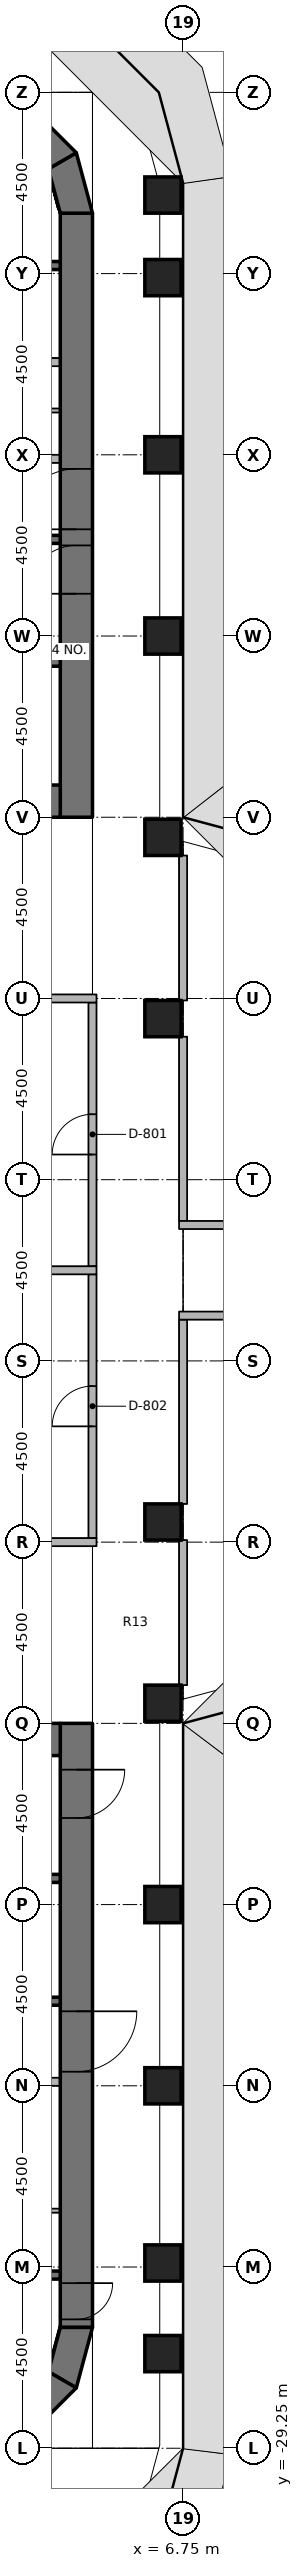
"""IFC4 building model, lengths in metres.
Left out: names, types, materials, properties, quantities, classifications, styles, units other than length and angle.
Written with IfcOpenShell. Run it as: python <this file> out.ifc"""

import sys

from ifc_helpers import new_model, si_unit, direction, frame, frame_2d, origin, origin_2d, place, context, subcontext, project, spatial, polyline, rectangle, outline, extrude, element, fill, save


model = new_model("IFC4")
c1 = context("Model", 3, precision=1e-05, world=origin(), true_north=direction((0.0, 1.0)))
c2 = subcontext(c1, "Body", "Model", "MODEL_VIEW")
j1 = project(units=[si_unit("LENGTHUNIT", "METRE"), si_unit("PLANEANGLEUNIT", "RADIAN")], contexts=[c1])
p1 = place(None, origin())
s1 = spatial("IfcSite", under=j1, at=p1, CompositionType="ELEMENT")
p2 = place(p1, origin())
s2 = spatial("IfcBuilding", under=s1, at=p2, CompositionType="ELEMENT")
p3 = place(p2, frame((0.0, 0.0, 98.0)))
s3 = spatial("IfcBuildingStorey", under=s2, at=p3, CompositionType="ELEMENT", Elevation=98.0)
for number, where, z_axis, x_axis in (
    (1, (6.25, -26.9, 0.0), (0.0, 0.0, 1.0), (1.0, 0.0, 0.0)),
    (2, (6.25, -24.65, 0.0), (0.0, 0.0, 1.0), (1.0, 0.0, 0.0)),
    (3, (6.25, -20.25, 0.0), (0.0, 0.0, 1.0), (1.0, 0.0, 0.0)),
    (4, (6.25, -15.75, 0.0), (0.0, 0.0, 1.0), (1.0, 0.0, 0.0)),
    (5, (6.25, -10.75, 0.0), (0.0, 0.0, 1.0), (1.0, 0.0, 0.0)),
    (6, (6.25, -6.25, 0.0), (0.0, 0.0, 1.0), (1.0, 0.0, 0.0)),
    (7, (6.25, 6.25, 0.0), (0.0, 0.0, 1.0), (1.0, 0.0, 0.0)),
    (8, (6.25, 10.75, 0.0), (0.0, 0.0, 1.0), (1.0, 0.0, 0.0)),
    (9, (6.25, 15.75, 0.0), (0.0, 0.0, 1.0), (1.0, 0.0, 0.0)),
    (10, (6.25, 20.25, 0.0), (0.0, 0.0, 1.0), (1.0, 0.0, 0.0)),
    (11, (6.25, 24.65, 0.0), (0.0, 0.0, 1.0), (1.0, 0.0, 0.0)),
    (12, (6.25, 26.7, 0.0), (0.0, 0.0, 1.0), (1.0, 0.0, 0.0)),
):
    element("IfcColumn", number, at=place(p3, frame(where, z_axis=z_axis, x_axis=x_axis)), inside=s3, PredefinedType="COLUMN", context=c2, shape_type="SweptSolid", body=[
        extrude(rectangle(XDim=0.9, YDim=0.9, at=origin_2d()), origin(), (0.0, 0.0, 1.0), 3.65),
    ])
p4 = place(p3, frame((4.1, 11.25, 0.0), z_axis=(0.0, 0.0, 1.0), x_axis=(0.0, 1.0, 0.0)))
e13 = element("IfcWall", 13, at=p4, inside=s3, PredefinedType="SHEAR", context=c2, shape_type="SweptSolid", body=[
    extrude(rectangle(XDim=15.0, YDim=0.8, at=frame_2d((7.5, 0.0))), origin(), (0.0, 0.0, 1.0), 3.8),
])
p5 = place(p4, frame((7.15, 0.0, 0.0)))
e14 = element("IfcOpeningElement", 14, at=p5, cuts=e13, PredefinedType="OPENING", context=c2, shape_type="SweptSolid", body=[
    extrude(rectangle(XDim=1.5, YDim=2.3, at=frame_2d((0.75, 1.15))), frame((0.0, 0.41, 0.0), z_axis=(0.0, -1.0, 0.0), x_axis=(1.0, 0.0, 0.0)), (0.0, 0.0, 1.0), 0.82),
])
p6 = place(p4, frame((5.55, 0.0, 0.0)))
e15 = element("IfcOpeningElement", 15, at=p6, cuts=e13, PredefinedType="OPENING", context=c2, shape_type="SweptSolid", body=[
    extrude(rectangle(XDim=1.2, YDim=2.1, at=frame_2d((0.6, 1.05))), frame((0.0, 0.41, 0.0), z_axis=(0.0, -1.0, 0.0), x_axis=(1.0, 0.0, 0.0)), (0.0, 0.0, 1.0), 0.82),
])
p7 = place(p3, frame((-3.7, 11.65, 0.0), z_axis=(0.0, 0.0, 1.0), x_axis=(1.0, 0.0, 0.0)))
e16 = element("IfcWall", 16, at=p7, inside=s3, PredefinedType="SHEAR", context=c2, shape_type="SweptSolid", body=[
    extrude(rectangle(XDim=7.4, YDim=0.8, at=frame_2d((3.7, 0.0))), origin(), (0.0, 0.0, 1.0), 3.8),
])
p8 = place(p3, origin())
e17 = element("IfcWall", 17, at=p8, inside=s3, PredefinedType="SHEAR", context=c2, shape_type="SweptSolid", body=[
    extrude(outline(polyline([(4.5, 26.25), (4.098, 27.75), (3.405, 27.35), (3.7, 26.25), (4.5, 26.25)])), origin(), (0.0, 0.0, 1.0), 3.8),
])
p9 = place(p3, origin())
e18 = element("IfcWall", 18, at=p9, inside=s3, PredefinedType="SHEAR", context=c2, shape_type="SweptSolid", body=[
    extrude(outline(polyline([(4.098, 27.75), (3.0, 28.848), (2.6, 28.155), (3.405, 27.35), (4.098, 27.75)])), origin(), (0.0, 0.0, 1.0), 3.8),
])
p10 = place(p3, frame((4.1, -11.25, 0.0), z_axis=(0.0, 0.0, 1.0), x_axis=(0.0, -1.0, 0.0)))
e19 = element("IfcWall", 19, at=p10, inside=s3, PredefinedType="SHEAR", context=c2, shape_type="SweptSolid", body=[
    extrude(rectangle(XDim=15.0, YDim=0.8, at=frame_2d((7.5, 0.0))), origin(), (0.0, 0.0, 1.0), 3.8),
])
p11 = place(p10, frame((7.15, 0.0, 0.0)))
e20 = element("IfcOpeningElement", 20, at=p11, cuts=e19, PredefinedType="OPENING", context=c2, shape_type="SweptSolid", body=[
    extrude(rectangle(XDim=1.5, YDim=2.3, at=frame_2d((0.75, 1.15))), frame((0.0, 0.41, 0.0), z_axis=(0.0, -1.0, 0.0), x_axis=(1.0, 0.0, 0.0)), (0.0, 0.0, 1.0), 0.82),
])
p12 = place(p10, frame((13.9, 0.0, 0.0)))
e21 = element("IfcOpeningElement", 21, at=p12, cuts=e19, PredefinedType="OPENING", context=c2, shape_type="SweptSolid", body=[
    extrude(rectangle(XDim=0.9, YDim=2.1, at=frame_2d((0.45, 1.05))), frame((0.0, 0.41, 0.0), z_axis=(0.0, -1.0, 0.0), x_axis=(1.0, 0.0, 0.0)), (0.0, 0.0, 1.0), 0.82),
])
p13 = place(p10, frame((1.15, 0.0, 0.0)))
e22 = element("IfcOpeningElement", 22, at=p13, cuts=e19, PredefinedType="OPENING", context=c2, shape_type="SweptSolid", body=[
    extrude(rectangle(XDim=1.2, YDim=2.1, at=frame_2d((0.6, 1.05))), frame((0.0, 0.41, 0.0), z_axis=(0.0, -1.0, 0.0), x_axis=(1.0, 0.0, 0.0)), (0.0, 0.0, 1.0), 0.82),
])
p14 = place(p3, frame((-3.7, -11.65, 0.0), z_axis=(0.0, 0.0, 1.0), x_axis=(1.0, 0.0, 0.0)))
e23 = element("IfcWall", 23, at=p14, inside=s3, PredefinedType="SHEAR", context=c2, shape_type="SweptSolid", body=[
    extrude(rectangle(XDim=7.4, YDim=0.8, at=frame_2d((3.7, 0.0))), origin(), (0.0, 0.0, 1.0), 3.8),
])
p15 = place(p3, origin())
e24 = element("IfcWall", 24, at=p15, inside=s3, PredefinedType="SHEAR", context=c2, shape_type="SweptSolid", body=[
    extrude(outline(polyline([(4.5, -26.25), (4.098, -27.75), (3.405, -27.35), (3.7, -26.25), (4.5, -26.25)])), origin(), (0.0, 0.0, 1.0), 3.8),
])
p16 = place(p3, origin())
e25 = element("IfcWall", 25, at=p16, inside=s3, PredefinedType="SHEAR", context=c2, shape_type="SweptSolid", body=[
    extrude(outline(polyline([(4.098, -27.75), (3.0, -28.848), (2.6, -28.155), (3.405, -27.35), (4.098, -27.75)])), origin(), (0.0, 0.0, 1.0), 3.8),
])
for number, where, z_axis, x_axis in (
    (26, (-3.7, 24.95, 0.0), (0.0, 0.0, 1.0), (1.0, 0.0, 0.0)),
    (27, (-3.7, 18.15, 0.0), (0.0, 0.0, 1.0), (1.0, 0.0, 0.0)),
    (28, (-3.7, 15.1, 0.0), (0.0, 0.0, 1.0), (1.0, 0.0, 0.0)),
):
    element("IfcWall", number, at=place(p3, frame(where, z_axis=z_axis, x_axis=x_axis)), inside=s3, PredefinedType="SHEAR", context=c2, shape_type="SweptSolid", body=[
        extrude(rectangle(XDim=7.4, YDim=0.2, at=frame_2d((3.7, 0.0))), origin(), (0.0, 0.0, 1.0), 3.65),
    ])
p17 = place(p3, frame((0.9, 20.15, 0.0), z_axis=(0.0, 0.0, 1.0), x_axis=(1.0, 0.0, 0.0)))
e29 = element("IfcWall", 29, at=p17, inside=s3, PredefinedType="PARTITIONING", context=c2, shape_type="SweptSolid", body=[
    extrude(rectangle(XDim=2.8, YDim=0.2, at=frame_2d((1.4, 0.0))), origin(), (0.0, 0.0, 1.0), 3.65),
])
p18 = place(p3, frame((1.1, 22.55, 0.0), z_axis=(0.0, 0.0, 1.0), x_axis=(1.0, 0.0, 0.0)))
e30 = element("IfcWall", 30, at=p18, inside=s3, PredefinedType="PARTITIONING", context=c2, shape_type="SweptSolid", body=[
    extrude(rectangle(XDim=2.6, YDim=0.2, at=frame_2d((1.3, 0.0))), origin(), (0.0, 0.0, 1.0), 3.65),
])
p19 = place(p3, frame((1.1, 21.35, 0.0), z_axis=(0.0, 0.0, 1.0), x_axis=(1.0, 0.0, 0.0)))
e31 = element("IfcWall", 31, at=p19, inside=s3, PredefinedType="PARTITIONING", context=c2, shape_type="SweptSolid", body=[
    extrude(rectangle(XDim=2.6, YDim=0.1, at=frame_2d((1.3, 0.0))), origin(), (0.0, 0.0, 1.0), 3.65),
])
for number, where, z_axis, x_axis in (
    (32, (3.7, -24.95, 0.0), (0.0, 0.0, 1.0), (-1.0, 0.0, 0.0)),
    (33, (3.7, -18.15, 0.0), (0.0, 0.0, 1.0), (-1.0, 0.0, 0.0)),
    (34, (3.7, -15.1, 0.0), (0.0, 0.0, 1.0), (-1.0, 0.0, 0.0)),
):
    element("IfcWall", number, at=place(p3, frame(where, z_axis=z_axis, x_axis=x_axis)), inside=s3, PredefinedType="SHEAR", context=c2, shape_type="SweptSolid", body=[
        extrude(rectangle(XDim=7.4, YDim=0.2, at=frame_2d((3.7, 0.0))), origin(), (0.0, 0.0, 1.0), 3.65),
    ])
p20 = place(p3, frame((3.7, -20.15, 0.0), z_axis=(0.0, 0.0, 1.0), x_axis=(-1.0, 0.0, 0.0)))
e35 = element("IfcWall", 35, at=p20, inside=s3, PredefinedType="PARTITIONING", context=c2, shape_type="SweptSolid", body=[
    extrude(rectangle(XDim=2.8, YDim=0.2, at=frame_2d((1.4, 0.0))), origin(), (0.0, 0.0, 1.0), 3.65),
])
p21 = place(p3, frame((3.7, -23.35, 0.0), z_axis=(0.0, 0.0, 1.0), x_axis=(-1.0, 0.0, 0.0)))
e36 = element("IfcWall", 36, at=p21, inside=s3, PredefinedType="PARTITIONING", context=c2, shape_type="SweptSolid", body=[
    extrude(rectangle(XDim=2.6, YDim=0.1, at=frame_2d((1.3, 0.0))), origin(), (0.0, 0.0, 1.0), 3.65),
])
p22 = place(p3, frame((4.5, 0.1, 0.0), z_axis=(0.0, 0.0, 1.0), x_axis=(0.0, 1.0, 0.0)))
e37 = element("IfcWall", 37, at=p22, inside=s3, PredefinedType="PARTITIONING", context=c2, shape_type="SweptSolid", body=[
    extrude(rectangle(XDim=6.55, YDim=0.2, at=frame_2d((3.275, 0.0))), origin(), (0.0, 0.0, 1.0), 2.738),
])
p23 = place(p22, frame((2.775, 0.0, 0.0)))
e38 = element("IfcOpeningElement", 38, at=p23, cuts=e37, PredefinedType="OPENING", context=c2, shape_type="SweptSolid", body=[
    extrude(rectangle(XDim=1.0, YDim=2.1, at=frame_2d((0.5, 1.05))), frame((0.0, 0.11, 0.0), z_axis=(0.0, -1.0, 0.0), x_axis=(1.0, 0.0, 0.0)), (0.0, 0.0, 1.0), 0.22),
])
p24 = place(p3, frame((4.5, -6.65, 0.0), z_axis=(0.0, 0.0, 1.0), x_axis=(0.0, 1.0, 0.0)))
e39 = element("IfcWall", 39, at=p24, inside=s3, PredefinedType="PARTITIONING", context=c2, shape_type="SweptSolid", body=[
    extrude(rectangle(XDim=6.55, YDim=0.2, at=frame_2d((3.275, 0.0))), origin(), (0.0, 0.0, 1.0), 2.738),
])
p25 = place(p24, frame((2.775, 0.0, 0.0)))
e40 = element("IfcOpeningElement", 40, at=p25, cuts=e39, PredefinedType="OPENING", context=c2, shape_type="SweptSolid", body=[
    extrude(rectangle(XDim=1.0, YDim=2.1, at=frame_2d((0.5, 1.05))), frame((0.0, 0.11, 0.0), z_axis=(0.0, -1.0, 0.0), x_axis=(1.0, 0.0, 0.0)), (0.0, 0.0, 1.0), 0.22),
])
p26 = place(p3, frame((6.75, 1.225, 0.0), z_axis=(0.0, 0.0, 1.0), x_axis=(0.0, 1.0, 0.0)))
e41 = element("IfcWall", 41, at=p26, inside=s3, PredefinedType="PARTITIONING", context=c2, shape_type="SweptSolid", body=[
    extrude(rectangle(XDim=4.575, YDim=0.2, at=frame_2d((2.288, 0.0))), origin(), (0.0, 0.0, 1.0), 2.738),
])
for number, where, z_axis, x_axis in (
    (42, (6.75, 6.7, 0.0), (0.0, 0.0, 1.0), (0.0, 1.0, 0.0)),
    (43, (6.75, -10.3, 0.0), (0.0, 0.0, 1.0), (0.0, 1.0, 0.0)),
):
    element("IfcWall", number, at=place(p3, frame(where, z_axis=z_axis, x_axis=x_axis)), inside=s3, PredefinedType="PARTITIONING", context=c2, shape_type="SweptSolid", body=[
        extrude(rectangle(XDim=3.6, YDim=0.2, at=frame_2d((1.8, 0.0))), origin(), (0.0, 0.0, 1.0), 2.738),
    ])
p27 = place(p3, frame((6.75, -5.8, 0.0), z_axis=(0.0, 0.0, 1.0), x_axis=(0.0, 1.0, 0.0)))
e44 = element("IfcWall", 44, at=p27, inside=s3, PredefinedType="PARTITIONING", context=c2, shape_type="SweptSolid", body=[
    extrude(rectangle(XDim=4.575, YDim=0.2, at=frame_2d((2.288, 0.0))), origin(), (0.0, 0.0, 1.0), 2.738),
])
for number, where, z_axis, x_axis in (
    (45, (-0.1, 6.75, 0.0), (0.0, 0.0, 1.0), (1.0, 0.0, 0.0)),
    (46, (-0.1, -6.75, 0.0), (0.0, 0.0, 1.0), (1.0, 0.0, 0.0)),
    (47, (-0.1, 0.0, 0.0), (0.0, 0.0, 1.0), (1.0, 0.0, 0.0)),
):
    element("IfcWall", number, at=place(p3, frame(where, z_axis=z_axis, x_axis=x_axis)), inside=s3, PredefinedType="PARTITIONING", context=c2, shape_type="SweptSolid", body=[
        extrude(rectangle(XDim=4.7, YDim=0.2, at=frame_2d((2.35, 0.0))), origin(), (0.0, 0.0, 1.0), 2.738),
    ])
p28 = place(p3, frame((6.65, 1.125, 0.0), z_axis=(0.0, 0.0, 1.0), x_axis=(1.0, 0.0, 0.0)))
e48 = element("IfcWall", 48, at=p28, inside=s3, PredefinedType="PARTITIONING", context=c2, shape_type="SweptSolid", body=[
    extrude(rectangle(XDim=4.7, YDim=0.2, at=frame_2d((2.35, 0.0))), origin(), (0.0, 0.0, 1.0), 2.738),
])
p29 = place(p28, frame((1.85, 0.0, 0.0)))
e49 = element("IfcOpeningElement", 49, at=p29, cuts=e48, PredefinedType="OPENING", context=c2, shape_type="SweptSolid", body=[
    extrude(rectangle(XDim=1.0, YDim=2.1, at=frame_2d((0.5, 1.05))), frame((0.0, 0.11, 0.0), z_axis=(0.0, -1.0, 0.0), x_axis=(1.0, 0.0, 0.0)), (0.0, 0.0, 1.0), 0.22),
])
p30 = place(p3, frame((11.35, -1.125, 0.0), z_axis=(0.0, 0.0, 1.0), x_axis=(-1.0, 0.0, 0.0)))
e50 = element("IfcWall", 50, at=p30, inside=s3, PredefinedType="PARTITIONING", context=c2, shape_type="SweptSolid", body=[
    extrude(rectangle(XDim=4.7, YDim=0.2, at=frame_2d((2.35, 0.0))), origin(), (0.0, 0.0, 1.0), 2.738),
])
p31 = place(p30, frame((1.85, 0.0, 0.0)))
e51 = element("IfcOpeningElement", 51, at=p31, cuts=e50, PredefinedType="OPENING", context=c2, shape_type="SweptSolid", body=[
    extrude(rectangle(XDim=1.0, YDim=2.1, at=frame_2d((0.5, 1.05))), frame((0.0, 0.11, 0.0), z_axis=(0.0, -1.0, 0.0), x_axis=(1.0, 0.0, 0.0)), (0.0, 0.0, 1.0), 0.22),
])
p32 = place(p5, origin())
e52 = element("IfcDoor", 52, at=p32, inside=s3, OperationType="DOUBLE_DOOR_SINGLE_SWING", PredefinedType="DOOR", context=c2, shape_type="SweptSolid", body=[
    extrude(rectangle(XDim=1.5, YDim=2.3, at=frame_2d((0.75, 1.15))), frame((0.0, 0.025, 0.0), z_axis=(0.0, -1.0, 0.0), x_axis=(1.0, 0.0, 0.0)), (0.0, 0.0, 1.0), 0.05),
])
fill(e14, e52)
p33 = place(p6, origin())
e53 = element("IfcDoor", 53, at=p33, inside=s3, OperationType="SINGLE_SWING_RIGHT", PredefinedType="DOOR", context=c2, shape_type="SweptSolid", body=[
    extrude(rectangle(XDim=1.2, YDim=2.1, at=frame_2d((0.6, 1.05))), frame((0.0, 0.025, 0.0), z_axis=(0.0, -1.0, 0.0), x_axis=(1.0, 0.0, 0.0)), (0.0, 0.0, 1.0), 0.05),
])
fill(e15, e53)
p34 = place(p11, origin())
e54 = element("IfcDoor", 54, at=p34, inside=s3, OperationType="DOUBLE_DOOR_SINGLE_SWING", PredefinedType="DOOR", context=c2, shape_type="SweptSolid", body=[
    extrude(rectangle(XDim=1.5, YDim=2.3, at=frame_2d((0.75, 1.15))), frame((0.0, 0.025, 0.0), z_axis=(0.0, -1.0, 0.0), x_axis=(1.0, 0.0, 0.0)), (0.0, 0.0, 1.0), 0.05),
])
fill(e20, e54)
p35 = place(p12, origin())
e55 = element("IfcDoor", 55, at=p35, inside=s3, OperationType="SINGLE_SWING_RIGHT", PredefinedType="DOOR", context=c2, shape_type="SweptSolid", body=[
    extrude(rectangle(XDim=0.9, YDim=2.1, at=frame_2d((0.45, 1.05))), frame((0.0, 0.025, 0.0), z_axis=(0.0, -1.0, 0.0), x_axis=(1.0, 0.0, 0.0)), (0.0, 0.0, 1.0), 0.05),
])
fill(e21, e55)
p36 = place(p13, origin())
e56 = element("IfcDoor", 56, at=p36, inside=s3, OperationType="SINGLE_SWING_RIGHT", PredefinedType="DOOR", context=c2, shape_type="SweptSolid", body=[
    extrude(rectangle(XDim=1.2, YDim=2.1, at=frame_2d((0.6, 1.05))), frame((0.0, 0.025, 0.0), z_axis=(0.0, -1.0, 0.0), x_axis=(1.0, 0.0, 0.0)), (0.0, 0.0, 1.0), 0.05),
])
fill(e22, e56)
p37 = place(p23, origin())
e57 = element("IfcDoor", 57, at=p37, inside=s3, OperationType="SINGLE_SWING_LEFT", PredefinedType="DOOR", context=c2, shape_type="SweptSolid", body=[
    extrude(rectangle(XDim=1.0, YDim=2.1, at=frame_2d((0.5, 1.05))), frame((0.0, 0.025, 0.0), z_axis=(0.0, -1.0, 0.0), x_axis=(1.0, 0.0, 0.0)), (0.0, 0.0, 1.0), 0.05),
])
fill(e38, e57)
p38 = place(p25, origin())
e58 = element("IfcDoor", 58, at=p38, inside=s3, OperationType="SINGLE_SWING_RIGHT", PredefinedType="DOOR", context=c2, shape_type="SweptSolid", body=[
    extrude(rectangle(XDim=1.0, YDim=2.1, at=frame_2d((0.5, 1.05))), frame((0.0, 0.025, 0.0), z_axis=(0.0, -1.0, 0.0), x_axis=(1.0, 0.0, 0.0)), (0.0, 0.0, 1.0), 0.05),
])
fill(e40, e58)
save(model, sys.argv[1])
